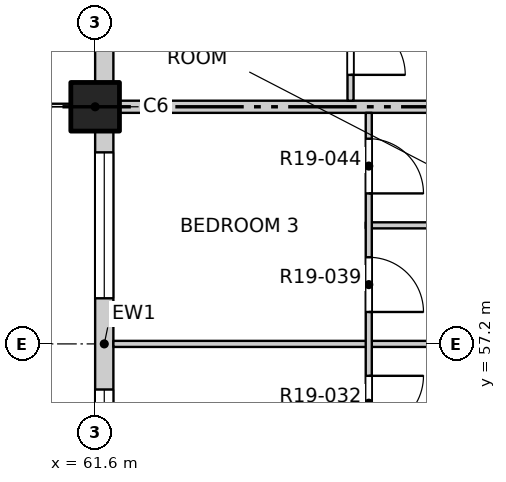
"""IFC4 building model, lengths in metres.
Left out: names, types, materials, properties, quantities, classifications, styles, units other than length and angle.
Written with IfcOpenShell. Run it as: python <this file> out.ifc"""

import sys

from ifc_helpers import new_model, si_unit, direction, frame, frame_2d, origin, origin_2d, place, context, subcontext, project, spatial, rectangle, extrude, element, fill, save


model = new_model("IFC4")
c1 = context("Model", 3, precision=1e-05, world=origin(), true_north=direction((0.0, 1.0)))
c2 = subcontext(c1, "Body", "Model", "MODEL_VIEW")
j1 = project(units=[si_unit("LENGTHUNIT", "METRE"), si_unit("PLANEANGLEUNIT", "RADIAN")], contexts=[c1])
p1 = place(None, origin())
s1 = spatial("IfcSite", under=j1, at=p1, CompositionType="ELEMENT")
p2 = place(p1, origin())
s2 = spatial("IfcBuilding", under=s1, at=p2, CompositionType="ELEMENT")
p3 = place(p2, frame((0.0, 0.0, 197.3)))
s3 = spatial("IfcBuildingStorey", under=s2, at=p3, CompositionType="ELEMENT", Elevation=197.3)
p4 = place(p3, frame((61.6, 61.1, -0.3), z_axis=(0.0, 0.0, 1.0), x_axis=(1.0, 0.0, 0.0)))
e1 = element("IfcColumn", 1, at=p4, inside=s3, PredefinedType="COLUMN", context=c2, shape_type="SweptSolid", body=[
    extrude(rectangle(XDim=0.8, YDim=0.8, at=origin_2d()), origin(), (0.0, 0.0, 1.0), 3.45),
])
p5 = place(p3, frame((61.75, 53.7, 0.0), z_axis=(0.0, 0.0, 1.0), x_axis=(0.0, 1.0, 0.0)))
e2 = element("IfcWall", 2, at=p5, inside=s3, PredefinedType="SOLIDWALL", context=c2, shape_type="SweptSolid", body=[
    extrude(rectangle(XDim=7.0, YDim=0.3, at=frame_2d((3.5, 0.0))), origin(), (0.0, 0.0, 1.0), 2.7),
])
p6 = place(p5, frame((0.35, 0.0, 0.9)))
e3 = element("IfcOpeningElement", 3, at=p6, cuts=e2, PredefinedType="OPENING", context=c2, shape_type="SweptSolid", body=[
    extrude(rectangle(XDim=2.4, YDim=1.8, at=frame_2d((1.2, 0.9))), frame((0.0, 0.16, 0.0), z_axis=(0.0, -1.0, 0.0), x_axis=(1.0, 0.0, 0.0)), (0.0, 0.0, 1.0), 0.32),
])
p7 = place(p5, frame((4.25, 0.0, 0.9)))
e4 = element("IfcOpeningElement", 4, at=p7, cuts=e2, PredefinedType="OPENING", context=c2, shape_type="SweptSolid", body=[
    extrude(rectangle(XDim=2.4, YDim=1.8, at=frame_2d((1.2, 0.9))), frame((0.0, 0.16, 0.0), z_axis=(0.0, -1.0, 0.0), x_axis=(1.0, 0.0, 0.0)), (0.0, 0.0, 1.0), 0.32),
])
p8 = place(p3, frame((61.75, 61.5, 0.0), z_axis=(0.0, 0.0, 1.0), x_axis=(0.0, 1.0, 0.0)))
e5 = element("IfcWall", 5, at=p8, inside=s3, PredefinedType="SOLIDWALL", context=c2, shape_type="SweptSolid", body=[
    extrude(rectangle(XDim=7.0, YDim=0.3, at=frame_2d((3.5, 0.0))), origin(), (0.0, 0.0, 1.0), 2.7),
])
p9 = place(p8, frame((0.65, 0.0, 0.0)))
e6 = element("IfcOpeningElement", 6, at=p9, cuts=e5, PredefinedType="OPENING", context=c2, shape_type="SweptSolid", body=[
    extrude(rectangle(XDim=1.8, YDim=2.4, at=frame_2d((0.9, 1.2))), frame((0.0, 0.16, 0.0), z_axis=(0.0, -1.0, 0.0), x_axis=(1.0, 0.0, 0.0)), (0.0, 0.0, 1.0), 0.32),
])
p10 = place(p8, frame((4.25, 0.0, 0.9)))
e7 = element("IfcOpeningElement", 7, at=p10, cuts=e5, PredefinedType="OPENING", context=c2, shape_type="SweptSolid", body=[
    extrude(rectangle(XDim=2.4, YDim=1.8, at=frame_2d((1.2, 0.9))), frame((0.0, 0.16, 0.0), z_axis=(0.0, -1.0, 0.0), x_axis=(1.0, 0.0, 0.0)), (0.0, 0.0, 1.0), 0.32),
])
p11 = place(p3, frame((61.9, 57.2, 0.0), z_axis=(0.0, 0.0, 1.0), x_axis=(1.0, 0.0, 0.0)))
e8 = element("IfcWall", 8, at=p11, inside=s3, PredefinedType="PARTITIONING", context=c2, shape_type="SweptSolid", body=[
    extrude(rectangle(XDim=7.55, YDim=0.1, at=frame_2d((3.775, 0.0))), origin(), (0.0, 0.0, 1.0), 3.15),
])
p12 = place(p3, frame((66.05, 59.15, 0.0), z_axis=(0.0, 0.0, 1.0), x_axis=(1.0, 0.0, 0.0)))
e9 = element("IfcWall", 9, at=p12, inside=s3, PredefinedType="PARTITIONING", context=c2, shape_type="SweptSolid", body=[
    extrude(rectangle(XDim=3.4, YDim=0.1, at=frame_2d((1.7, 0.0))), origin(), (0.0, 0.0, 1.0), 3.15),
])
p13 = place(p3, frame((61.9, 61.1, 0.0), z_axis=(0.0, 0.0, 1.0), x_axis=(1.0, 0.0, 0.0)))
e10 = element("IfcWall", 10, at=p13, inside=s3, PredefinedType="PARTITIONING", context=c2, shape_type="SweptSolid", body=[
    extrude(rectangle(XDim=11.5, YDim=0.2, at=frame_2d((5.75, 0.0))), origin(), (0.0, 0.0, 1.0), 2.55),
])
p14 = place(p3, frame((65.8, 61.2, 0.0), z_axis=(0.0, 0.0, 1.0), x_axis=(0.0, 1.0, 0.0)))
e11 = element("IfcWall", 11, at=p14, inside=s3, PredefinedType="PARTITIONING", context=c2, shape_type="SweptSolid", body=[
    extrude(rectangle(XDim=26.9, YDim=0.1, at=frame_2d((13.45, 0.0))), origin(), (0.0, 0.0, 1.0), 3.15),
])
p15 = place(p14, frame((0.425, 0.0, 0.0)))
e12 = element("IfcOpeningElement", 12, at=p15, cuts=e11, PredefinedType="OPENING", context=c2, shape_type="SweptSolid", body=[
    extrude(rectangle(XDim=0.9, YDim=2.1, at=frame_2d((0.45, 1.05))), frame((0.0, 0.06, 0.0), z_axis=(0.0, -1.0, 0.0), x_axis=(1.0, 0.0, 0.0)), (0.0, 0.0, 1.0), 0.12),
])
p16 = place(p14, frame((2.375, 0.0, 0.0)))
e13 = element("IfcOpeningElement", 13, at=p16, cuts=e11, PredefinedType="OPENING", context=c2, shape_type="SweptSolid", body=[
    extrude(rectangle(XDim=0.9, YDim=2.1, at=frame_2d((0.45, 1.05))), frame((0.0, 0.06, 0.0), z_axis=(0.0, -1.0, 0.0), x_axis=(1.0, 0.0, 0.0)), (0.0, 0.0, 1.0), 0.12),
])
p17 = place(p14, frame((5.15, 0.0, 0.0)))
e14 = element("IfcOpeningElement", 14, at=p17, cuts=e11, PredefinedType="OPENING", context=c2, shape_type="SweptSolid", body=[
    extrude(rectangle(XDim=1.2, YDim=2.1, at=frame_2d((0.6, 1.05))), frame((0.0, 0.06, 0.0), z_axis=(0.0, -1.0, 0.0), x_axis=(1.0, 0.0, 0.0)), (0.0, 0.0, 1.0), 0.12),
])
p18 = place(p14, frame((8.225, 0.0, 0.0)))
e15 = element("IfcOpeningElement", 15, at=p18, cuts=e11, PredefinedType="OPENING", context=c2, shape_type="SweptSolid", body=[
    extrude(rectangle(XDim=0.9, YDim=2.1, at=frame_2d((0.45, 1.05))), frame((0.0, 0.06, 0.0), z_axis=(0.0, -1.0, 0.0), x_axis=(1.0, 0.0, 0.0)), (0.0, 0.0, 1.0), 0.12),
])
p19 = place(p14, frame((10.175, 0.0, 0.0)))
e16 = element("IfcOpeningElement", 16, at=p19, cuts=e11, PredefinedType="OPENING", context=c2, shape_type="SweptSolid", body=[
    extrude(rectangle(XDim=0.9, YDim=2.1, at=frame_2d((0.45, 1.05))), frame((0.0, 0.06, 0.0), z_axis=(0.0, -1.0, 0.0), x_axis=(1.0, 0.0, 0.0)), (0.0, 0.0, 1.0), 0.12),
])
p20 = place(p14, frame((12.125, 0.0, 0.0)))
e17 = element("IfcOpeningElement", 17, at=p20, cuts=e11, PredefinedType="OPENING", context=c2, shape_type="SweptSolid", body=[
    extrude(rectangle(XDim=0.9, YDim=2.1, at=frame_2d((0.45, 1.05))), frame((0.0, 0.06, 0.0), z_axis=(0.0, -1.0, 0.0), x_axis=(1.0, 0.0, 0.0)), (0.0, 0.0, 1.0), 0.12),
])
p21 = place(p14, frame((14.075, 0.0, 0.0)))
e18 = element("IfcOpeningElement", 18, at=p21, cuts=e11, PredefinedType="OPENING", context=c2, shape_type="SweptSolid", body=[
    extrude(rectangle(XDim=0.9, YDim=2.1, at=frame_2d((0.45, 1.05))), frame((0.0, 0.06, 0.0), z_axis=(0.0, -1.0, 0.0), x_axis=(1.0, 0.0, 0.0)), (0.0, 0.0, 1.0), 0.12),
])
p22 = place(p14, frame((16.025, 0.0, 0.0)))
e19 = element("IfcOpeningElement", 19, at=p22, cuts=e11, PredefinedType="OPENING", context=c2, shape_type="SweptSolid", body=[
    extrude(rectangle(XDim=0.9, YDim=2.1, at=frame_2d((0.45, 1.05))), frame((0.0, 0.06, 0.0), z_axis=(0.0, -1.0, 0.0), x_axis=(1.0, 0.0, 0.0)), (0.0, 0.0, 1.0), 0.12),
])
p23 = place(p14, frame((17.975, 0.0, 0.0)))
e20 = element("IfcOpeningElement", 20, at=p23, cuts=e11, PredefinedType="OPENING", context=c2, shape_type="SweptSolid", body=[
    extrude(rectangle(XDim=0.9, YDim=2.1, at=frame_2d((0.45, 1.05))), frame((0.0, 0.06, 0.0), z_axis=(0.0, -1.0, 0.0), x_axis=(1.0, 0.0, 0.0)), (0.0, 0.0, 1.0), 0.12),
])
p24 = place(p14, frame((20.75, 0.0, 0.0)))
e21 = element("IfcOpeningElement", 21, at=p24, cuts=e11, PredefinedType="OPENING", context=c2, shape_type="SweptSolid", body=[
    extrude(rectangle(XDim=1.2, YDim=2.1, at=frame_2d((0.6, 1.05))), frame((0.0, 0.06, 0.0), z_axis=(0.0, -1.0, 0.0), x_axis=(1.0, 0.0, 0.0)), (0.0, 0.0, 1.0), 0.12),
])
p25 = place(p14, frame((24.65, 0.0, 0.0)))
e22 = element("IfcOpeningElement", 22, at=p25, cuts=e11, PredefinedType="OPENING", context=c2, shape_type="SweptSolid", body=[
    extrude(rectangle(XDim=1.2, YDim=2.1, at=frame_2d((0.6, 1.05))), frame((0.0, 0.06, 0.0), z_axis=(0.0, -1.0, 0.0), x_axis=(1.0, 0.0, 0.0)), (0.0, 0.0, 1.0), 0.12),
])
p26 = place(p3, frame((66.1, 41.9, 0.0), z_axis=(0.0, 0.0, 1.0), x_axis=(0.0, 1.0, 0.0)))
e23 = element("IfcWall", 23, at=p26, inside=s3, PredefinedType="PARTITIONING", context=c2, shape_type="SweptSolid", body=[
    extrude(rectangle(XDim=19.1, YDim=0.1, at=frame_2d((9.55, 0.0))), origin(), (0.0, 0.0, 1.0), 3.15),
])
p27 = place(p26, frame((1.05, 0.0, 0.0)))
e24 = element("IfcOpeningElement", 24, at=p27, cuts=e23, PredefinedType="OPENING", context=c2, shape_type="SweptSolid", body=[
    extrude(rectangle(XDim=1.2, YDim=2.1, at=frame_2d((0.6, 1.05))), frame((0.0, 0.06, 0.0), z_axis=(0.0, -1.0, 0.0), x_axis=(1.0, 0.0, 0.0)), (0.0, 0.0, 1.0), 0.12),
])
p28 = place(p26, frame((4.95, 0.0, 0.0)))
e25 = element("IfcOpeningElement", 25, at=p28, cuts=e23, PredefinedType="OPENING", context=c2, shape_type="SweptSolid", body=[
    extrude(rectangle(XDim=1.2, YDim=2.1, at=frame_2d((0.6, 1.05))), frame((0.0, 0.06, 0.0), z_axis=(0.0, -1.0, 0.0), x_axis=(1.0, 0.0, 0.0)), (0.0, 0.0, 1.0), 0.12),
])
p29 = place(p26, frame((8.85, 0.0, 0.0)))
e26 = element("IfcOpeningElement", 26, at=p29, cuts=e23, PredefinedType="OPENING", context=c2, shape_type="SweptSolid", body=[
    extrude(rectangle(XDim=1.2, YDim=2.1, at=frame_2d((0.6, 1.05))), frame((0.0, 0.06, 0.0), z_axis=(0.0, -1.0, 0.0), x_axis=(1.0, 0.0, 0.0)), (0.0, 0.0, 1.0), 0.12),
])
p30 = place(p26, frame((11.925, 0.0, 0.0)))
e27 = element("IfcOpeningElement", 27, at=p30, cuts=e23, PredefinedType="OPENING", context=c2, shape_type="SweptSolid", body=[
    extrude(rectangle(XDim=0.9, YDim=2.1, at=frame_2d((0.45, 1.05))), frame((0.0, 0.06, 0.0), z_axis=(0.0, -1.0, 0.0), x_axis=(1.0, 0.0, 0.0)), (0.0, 0.0, 1.0), 0.12),
])
p31 = place(p26, frame((13.875, 0.0, 0.0)))
e28 = element("IfcOpeningElement", 28, at=p31, cuts=e23, PredefinedType="OPENING", context=c2, shape_type="SweptSolid", body=[
    extrude(rectangle(XDim=0.9, YDim=2.1, at=frame_2d((0.45, 1.05))), frame((0.0, 0.06, 0.0), z_axis=(0.0, -1.0, 0.0), x_axis=(1.0, 0.0, 0.0)), (0.0, 0.0, 1.0), 0.12),
])
p32 = place(p26, frame((15.825, 0.0, 0.0)))
e29 = element("IfcOpeningElement", 29, at=p32, cuts=e23, PredefinedType="OPENING", context=c2, shape_type="SweptSolid", body=[
    extrude(rectangle(XDim=0.9, YDim=2.1, at=frame_2d((0.45, 1.05))), frame((0.0, 0.06, 0.0), z_axis=(0.0, -1.0, 0.0), x_axis=(1.0, 0.0, 0.0)), (0.0, 0.0, 1.0), 0.12),
])
p33 = place(p26, frame((17.775, 0.0, 0.0)))
e30 = element("IfcOpeningElement", 30, at=p33, cuts=e23, PredefinedType="OPENING", context=c2, shape_type="SweptSolid", body=[
    extrude(rectangle(XDim=0.9, YDim=2.1, at=frame_2d((0.45, 1.05))), frame((0.0, 0.06, 0.0), z_axis=(0.0, -1.0, 0.0), x_axis=(1.0, 0.0, 0.0)), (0.0, 0.0, 1.0), 0.12),
])
p34 = place(p6, origin())
e31 = element("IfcWindow", 31, at=p34, inside=s3, PartitioningType="DOUBLE_PANEL_VERTICAL", PredefinedType="WINDOW", context=c2, shape_type="SweptSolid", body=[
    extrude(rectangle(XDim=2.4, YDim=1.8, at=frame_2d((1.2, 0.9))), frame((0.0, 0.03, 0.0), z_axis=(0.0, -1.0, 0.0), x_axis=(1.0, 0.0, 0.0)), (0.0, 0.0, 1.0), 0.06),
])
fill(e3, e31)
p35 = place(p7, origin())
e32 = element("IfcWindow", 32, at=p35, inside=s3, PartitioningType="DOUBLE_PANEL_VERTICAL", PredefinedType="WINDOW", context=c2, shape_type="SweptSolid", body=[
    extrude(rectangle(XDim=2.4, YDim=1.8, at=frame_2d((1.2, 0.9))), frame((0.0, 0.03, 0.0), z_axis=(0.0, -1.0, 0.0), x_axis=(1.0, 0.0, 0.0)), (0.0, 0.0, 1.0), 0.06),
])
fill(e4, e32)
p36 = place(p31, origin())
e33 = element("IfcDoor", 33, at=p36, inside=s3, OperationType="SINGLE_SWING_LEFT", PredefinedType="DOOR", context=c2, shape_type="SweptSolid", body=[
    extrude(rectangle(XDim=0.9, YDim=2.1, at=frame_2d((0.45, 1.05))), frame((0.0, 0.025, 0.0), z_axis=(0.0, -1.0, 0.0), x_axis=(1.0, 0.0, 0.0)), (0.0, 0.0, 1.0), 0.05),
])
fill(e28, e33)
p37 = place(p32, origin())
e34 = element("IfcDoor", 34, at=p37, inside=s3, OperationType="SINGLE_SWING_RIGHT", PredefinedType="DOOR", context=c2, shape_type="SweptSolid", body=[
    extrude(rectangle(XDim=0.9, YDim=2.1, at=frame_2d((0.45, 1.05))), frame((0.0, 0.025, 0.0), z_axis=(0.0, -1.0, 0.0), x_axis=(1.0, 0.0, 0.0)), (0.0, 0.0, 1.0), 0.05),
])
fill(e29, e34)
p38 = place(p33, origin())
e35 = element("IfcDoor", 35, at=p38, inside=s3, OperationType="SINGLE_SWING_RIGHT", PredefinedType="DOOR", context=c2, shape_type="SweptSolid", body=[
    extrude(rectangle(XDim=0.9, YDim=2.1, at=frame_2d((0.45, 1.05))), frame((0.0, 0.025, 0.0), z_axis=(0.0, -1.0, 0.0), x_axis=(1.0, 0.0, 0.0)), (0.0, 0.0, 1.0), 0.05),
])
fill(e30, e35)
p39 = place(p15, origin())
e36 = element("IfcDoor", 36, at=p39, inside=s3, OperationType="SINGLE_SWING_RIGHT", PredefinedType="DOOR", context=c2, shape_type="SweptSolid", body=[
    extrude(rectangle(XDim=0.9, YDim=2.1, at=frame_2d((0.45, 1.05))), frame((0.0, 0.025, 0.0), z_axis=(0.0, -1.0, 0.0), x_axis=(1.0, 0.0, 0.0)), (0.0, 0.0, 1.0), 0.05),
])
fill(e12, e36)
save(model, sys.argv[1])
